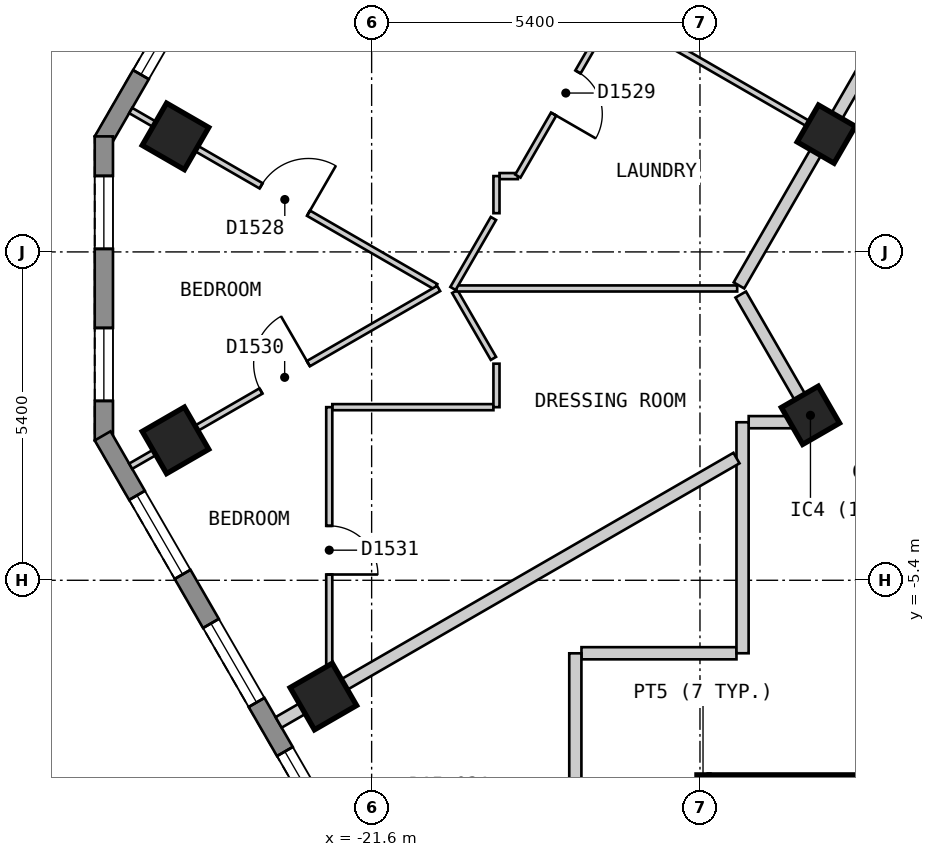
"""IFC4 building model, lengths in metres.
Left out: names, types, materials, properties, quantities, classifications, styles, units other than length and angle.
Written with IfcOpenShell. Run it as: python <this file> out.ifc"""

import sys

from ifc_helpers import new_model, si_unit, direction, frame, frame_2d, origin, origin_2d, place, context, subcontext, project, spatial, polyline, rectangle, outline, extrude, element, fill, save


model = new_model("IFC4")
c1 = context("Model", 3, precision=1e-05, world=origin(), true_north=direction((0.0, 1.0)))
c2 = subcontext(c1, "Body", "Model", "MODEL_VIEW")
j1 = project(units=[si_unit("LENGTHUNIT", "METRE"), si_unit("PLANEANGLEUNIT", "RADIAN")], contexts=[c1])
p1 = place(None, origin())
s1 = spatial("IfcSite", under=j1, at=p1, CompositionType="ELEMENT")
p2 = place(p1, origin())
s2 = spatial("IfcBuilding", under=s1, at=p2, CompositionType="ELEMENT")
p3 = place(p2, frame((0.0, 0.0, 196.2)))
s3 = spatial("IfcBuildingStorey", under=s2, at=p3, CompositionType="ELEMENT", Elevation=196.2)
for number, where, z_axis, x_axis in (
    (1, (-24.826, 1.9, 0.0), (0.0, 0.0, 1.0), (-0.5, -0.866, 0.0)),
    (2, (-24.826, -3.099, 0.0), (0.0, 0.0, 1.0), (0.5, -0.866, 0.0)),
    (3, (-22.394, -7.312, 0.0), (0.0, 0.0, 1.0), (0.5, -0.866, 0.0)),
):
    element("IfcColumn", number, at=place(p3, frame(where, z_axis=z_axis, x_axis=x_axis)), inside=s3, PredefinedType="COLUMN", context=c2, shape_type="SweptSolid", body=[
        extrude(rectangle(XDim=0.8, YDim=0.8, at=origin_2d()), origin(), (0.0, 0.0, 1.0), 3.0),
    ])
for number, where, z_axis, x_axis in (
    (4, (-14.383, -2.687, 0.0), (0.0, 0.0, 1.0), (0.5, -0.866, 0.0)),
    (5, (-14.123, 1.937, 0.0), (0.0, 0.0, 1.0), (-0.5, -0.866, 0.0)),
):
    element("IfcColumn", number, at=place(p3, frame(where, z_axis=z_axis, x_axis=x_axis)), inside=s3, PredefinedType="COLUMN", context=c2, shape_type="SweptSolid", body=[
        extrude(rectangle(XDim=0.7, YDim=0.7, at=origin_2d()), origin(), (0.0, 0.0, 1.0), 3.0),
    ])
p4 = place(p3, frame((-14.592, 21.625, 0.0), z_axis=(0.0, 0.0, 1.0), x_axis=(-0.500010537973, -0.866019319597, 0.0)))
e6 = element("IfcWall", 6, at=p4, inside=s3, PredefinedType="SOLIDWALL", context=c2, shape_type="SweptSolid", body=[
    extrude(outline(polyline([(0.0, -0.15), (22.863, -0.15), (22.783, 0.15), (0.08, 0.15), (0.0, -0.15)])), origin(), (0.0, 0.0, 1.0), 2.6),
])
p5 = place(p4, frame((1.259, 0.0, 0.15)))
e7 = element("IfcOpeningElement", 7, at=p5, cuts=e6, PredefinedType="OPENING", context=c2, shape_type="SweptSolid", body=[
    extrude(rectangle(XDim=1.5, YDim=2.1, at=frame_2d((0.75, 1.05))), frame((0.0, 0.16, 0.0), z_axis=(0.0, -1.0, 0.0), x_axis=(1.0, 0.0, 0.0)), (0.0, 0.0, 1.0), 0.32),
])
p6 = place(p4, frame((3.952, 0.0, 0.15)))
e8 = element("IfcOpeningElement", 8, at=p6, cuts=e6, PredefinedType="OPENING", context=c2, shape_type="SweptSolid", body=[
    extrude(rectangle(XDim=1.5, YDim=2.1, at=frame_2d((0.75, 1.05))), frame((0.0, 0.16, 0.0), z_axis=(0.0, -1.0, 0.0), x_axis=(1.0, 0.0, 0.0)), (0.0, 0.0, 1.0), 0.32),
])
p7 = place(p4, frame((6.644, 0.0, 0.15)))
e9 = element("IfcOpeningElement", 9, at=p7, cuts=e6, PredefinedType="OPENING", context=c2, shape_type="SweptSolid", body=[
    extrude(rectangle(XDim=1.5, YDim=2.1, at=frame_2d((0.75, 1.05))), frame((0.0, 0.16, 0.0), z_axis=(0.0, -1.0, 0.0), x_axis=(1.0, 0.0, 0.0)), (0.0, 0.0, 1.0), 0.32),
])
p8 = place(p4, frame((9.335, 0.0, 0.15)))
e10 = element("IfcOpeningElement", 10, at=p8, cuts=e6, PredefinedType="OPENING", context=c2, shape_type="SweptSolid", body=[
    extrude(rectangle(XDim=1.5, YDim=2.1, at=frame_2d((0.75, 1.05))), frame((0.0, 0.16, 0.0), z_axis=(0.0, -1.0, 0.0), x_axis=(1.0, 0.0, 0.0)), (0.0, 0.0, 1.0), 0.32),
])
p9 = place(p4, frame((12.028, 0.0, 0.15)))
e11 = element("IfcOpeningElement", 11, at=p9, cuts=e6, PredefinedType="OPENING", context=c2, shape_type="SweptSolid", body=[
    extrude(rectangle(XDim=1.5, YDim=2.1, at=frame_2d((0.75, 1.05))), frame((0.0, 0.16, 0.0), z_axis=(0.0, -1.0, 0.0), x_axis=(1.0, 0.0, 0.0)), (0.0, 0.0, 1.0), 0.32),
])
p10 = place(p4, frame((14.72, 0.0, 0.15)))
e12 = element("IfcOpeningElement", 12, at=p10, cuts=e6, PredefinedType="OPENING", context=c2, shape_type="SweptSolid", body=[
    extrude(rectangle(XDim=1.5, YDim=2.1, at=frame_2d((0.75, 1.05))), frame((0.0, 0.16, 0.0), z_axis=(0.0, -1.0, 0.0), x_axis=(1.0, 0.0, 0.0)), (0.0, 0.0, 1.0), 0.32),
])
p11 = place(p4, frame((17.411, 0.0, 0.15)))
e13 = element("IfcOpeningElement", 13, at=p11, cuts=e6, PredefinedType="OPENING", context=c2, shape_type="SweptSolid", body=[
    extrude(rectangle(XDim=1.5, YDim=2.1, at=frame_2d((0.75, 1.05))), frame((0.0, 0.16, 0.0), z_axis=(0.0, -1.0, 0.0), x_axis=(1.0, 0.0, 0.0)), (0.0, 0.0, 1.0), 0.32),
])
p12 = place(p4, frame((20.104, 0.0, 0.15)))
e14 = element("IfcOpeningElement", 14, at=p12, cuts=e6, PredefinedType="OPENING", context=c2, shape_type="SweptSolid", body=[
    extrude(rectangle(XDim=1.5, YDim=2.1, at=frame_2d((0.75, 1.05))), frame((0.0, 0.16, 0.0), z_axis=(0.0, -1.0, 0.0), x_axis=(1.0, 0.0, 0.0)), (0.0, 0.0, 1.0), 0.32),
])
p13 = place(p3, frame((-26.004, 1.9, 0.0), z_axis=(0.0, 0.0, 1.0), x_axis=(0.0, -1.0, 0.0)))
e15 = element("IfcWall", 15, at=p13, inside=s3, PredefinedType="SOLIDWALL", context=c2, shape_type="SweptSolid", body=[
    extrude(outline(polyline([(0.0, -0.15), (5.0, -0.15), (4.92, 0.15), (0.08, 0.15), (0.0, -0.15)])), origin(), (0.0, 0.0, 1.0), 2.6),
])
p14 = place(p13, frame((0.65, 0.0, 0.15)))
e16 = element("IfcOpeningElement", 16, at=p14, cuts=e15, PredefinedType="OPENING", context=c2, shape_type="SweptSolid", body=[
    extrude(rectangle(XDim=1.2, YDim=2.1, at=frame_2d((0.6, 1.05))), frame((0.0, 0.16, 0.0), z_axis=(0.0, -1.0, 0.0), x_axis=(1.0, 0.0, 0.0)), (0.0, 0.0, 1.0), 0.32),
])
p15 = place(p13, frame((3.15, 0.0, 0.15)))
e17 = element("IfcOpeningElement", 17, at=p15, cuts=e15, PredefinedType="OPENING", context=c2, shape_type="SweptSolid", body=[
    extrude(rectangle(XDim=1.2, YDim=2.1, at=frame_2d((0.6, 1.05))), frame((0.0, 0.16, 0.0), z_axis=(0.0, -1.0, 0.0), x_axis=(1.0, 0.0, 0.0)), (0.0, 0.0, 1.0), 0.32),
])
p16 = place(p3, frame((-26.024, -3.025, 0.0), z_axis=(0.0, 0.0, 1.0), x_axis=(0.500018670445, -0.86601462413, 0.0)))
e18 = element("IfcWall", 18, at=p16, inside=s3, PredefinedType="SOLIDWALL", context=c2, shape_type="SweptSolid", body=[
    extrude(outline(polyline([(0.0, -0.15), (20.785, -0.15), (20.705, 0.15), (0.08, 0.15), (0.0, -0.15)])), origin(), (0.0, 0.0, 1.0), 2.6),
])
p17 = place(p16, frame((1.13, 0.0, 0.15)))
e19 = element("IfcOpeningElement", 19, at=p17, cuts=e18, PredefinedType="OPENING", context=c2, shape_type="SweptSolid", body=[
    extrude(rectangle(XDim=1.5, YDim=2.1, at=frame_2d((0.75, 1.05))), frame((0.0, 0.16, 0.0), z_axis=(0.0, -1.0, 0.0), x_axis=(1.0, 0.0, 0.0)), (0.0, 0.0, 1.0), 0.32),
])
p18 = place(p16, frame((3.562, 0.0, 0.15)))
e20 = element("IfcOpeningElement", 20, at=p18, cuts=e18, PredefinedType="OPENING", context=c2, shape_type="SweptSolid", body=[
    extrude(rectangle(XDim=1.5, YDim=2.1, at=frame_2d((0.75, 1.05))), frame((0.0, 0.16, 0.0), z_axis=(0.0, -1.0, 0.0), x_axis=(1.0, 0.0, 0.0)), (0.0, 0.0, 1.0), 0.32),
])
p19 = place(p16, frame((5.994, 0.0, 0.15)))
e21 = element("IfcOpeningElement", 21, at=p19, cuts=e18, PredefinedType="OPENING", context=c2, shape_type="SweptSolid", body=[
    extrude(rectangle(XDim=1.5, YDim=2.1, at=frame_2d((0.75, 1.05))), frame((0.0, 0.16, 0.0), z_axis=(0.0, -1.0, 0.0), x_axis=(1.0, 0.0, 0.0)), (0.0, 0.0, 1.0), 0.32),
])
p20 = place(p16, frame((8.425, 0.0, 0.15)))
e22 = element("IfcOpeningElement", 22, at=p20, cuts=e18, PredefinedType="OPENING", context=c2, shape_type="SweptSolid", body=[
    extrude(rectangle(XDim=1.5, YDim=2.1, at=frame_2d((0.75, 1.05))), frame((0.0, 0.16, 0.0), z_axis=(0.0, -1.0, 0.0), x_axis=(1.0, 0.0, 0.0)), (0.0, 0.0, 1.0), 0.32),
])
p21 = place(p16, frame((10.857, 0.0, 0.15)))
e23 = element("IfcOpeningElement", 23, at=p21, cuts=e18, PredefinedType="OPENING", context=c2, shape_type="SweptSolid", body=[
    extrude(rectangle(XDim=1.5, YDim=2.1, at=frame_2d((0.75, 1.05))), frame((0.0, 0.16, 0.0), z_axis=(0.0, -1.0, 0.0), x_axis=(1.0, 0.0, 0.0)), (0.0, 0.0, 1.0), 0.32),
])
p22 = place(p16, frame((13.289, 0.0, 0.15)))
e24 = element("IfcOpeningElement", 24, at=p22, cuts=e18, PredefinedType="OPENING", context=c2, shape_type="SweptSolid", body=[
    extrude(rectangle(XDim=1.5, YDim=2.1, at=frame_2d((0.75, 1.05))), frame((0.0, 0.16, 0.0), z_axis=(0.0, -1.0, 0.0), x_axis=(1.0, 0.0, 0.0)), (0.0, 0.0, 1.0), 0.32),
])
p23 = place(p16, frame((15.722, 0.0, 0.15)))
e25 = element("IfcOpeningElement", 25, at=p23, cuts=e18, PredefinedType="OPENING", context=c2, shape_type="SweptSolid", body=[
    extrude(rectangle(XDim=1.5, YDim=2.1, at=frame_2d((0.75, 1.05))), frame((0.0, 0.16, 0.0), z_axis=(0.0, -1.0, 0.0), x_axis=(1.0, 0.0, 0.0)), (0.0, 0.0, 1.0), 0.32),
])
p24 = place(p16, frame((18.154, 0.0, 0.15)))
e26 = element("IfcOpeningElement", 26, at=p24, cuts=e18, PredefinedType="OPENING", context=c2, shape_type="SweptSolid", body=[
    extrude(rectangle(XDim=1.5, YDim=2.1, at=frame_2d((0.75, 1.05))), frame((0.0, 0.16, 0.0), z_axis=(0.0, -1.0, 0.0), x_axis=(1.0, 0.0, 0.0)), (0.0, 0.0, 1.0), 0.32),
])
p25 = place(p3, frame((-15.53, -0.701, 0.0), z_axis=(0.0, 0.0, 1.0), x_axis=(0.499972710878, -0.866041158593, 0.0)))
e27 = element("IfcWall", 27, at=p25, inside=s3, PredefinedType="PARTITIONING", context=c2, shape_type="SweptSolid", body=[
    extrude(rectangle(XDim=2.308, YDim=0.2, at=frame_2d((1.154, 0.0))), origin(), (0.0, 0.0, 1.0), 2.6),
])
p26 = place(p3, frame((-18.149, -6.6, 0.0), z_axis=(0.0, 0.0, 1.0), x_axis=(1.0, 0.0, 0.0)))
e28 = element("IfcWall", 28, at=p26, inside=s3, PredefinedType="PARTITIONING", context=c2, shape_type="SweptSolid", body=[
    extrude(rectangle(XDim=2.549, YDim=0.2, at=frame_2d((1.274, 0.0))), origin(), (0.0, 0.0, 1.0), 2.6),
])
p27 = place(p3, frame((-15.399, -2.8, 0.0), z_axis=(0.0, 0.0, 1.0), x_axis=(1.0, 0.0, 0.0)))
e29 = element("IfcWall", 29, at=p27, inside=s3, PredefinedType="PARTITIONING", context=c2, shape_type="SweptSolid", body=[
    extrude(rectangle(XDim=1.081, YDim=0.2, at=frame_2d((0.541, 0.0))), origin(), (0.0, 0.0, 1.0), 2.6),
])
p28 = place(p3, frame((-15.559, -0.551, 0.0), z_axis=(0.0, 0.0, 1.0), x_axis=(0.499964997208, 0.866045611713, 0.0)))
e30 = element("IfcWall", 30, at=p28, inside=s3, PredefinedType="PARTITIONING", context=c2, shape_type="SweptSolid", body=[
    extrude(rectangle(XDim=9.643, YDim=0.2, at=frame_2d((4.821, 0.0))), origin(), (0.0, 0.0, 1.0), 2.6),
])
p29 = place(p28, frame((5.088, 0.0, 0.0)))
e31 = element("IfcOpeningElement", 31, at=p29, cuts=e30, PredefinedType="OPENING", context=c2, shape_type="SweptSolid", body=[
    extrude(rectangle(XDim=1.0, YDim=2.1, at=frame_2d((0.5, 1.05))), frame((0.0, 0.11, 0.0), z_axis=(0.0, -1.0, 0.0), x_axis=(1.0, 0.0, 0.0)), (0.0, 0.0, 1.0), 0.22),
])
p30 = place(p3, frame((-15.5, -6.6, 0.0), z_axis=(0.0, 0.0, 1.0), x_axis=(0.0, 1.0, 0.0)))
e32 = element("IfcWall", 32, at=p30, inside=s3, PredefinedType="PARTITIONING", context=c2, shape_type="SweptSolid", body=[
    extrude(rectangle(XDim=3.799, YDim=0.2, at=frame_2d((1.899, 0.0))), origin(), (0.0, 0.0, 1.0), 2.6),
])
p31 = place(p3, frame((-18.25, -16.152, 0.0), z_axis=(0.0, 0.0, 1.0), x_axis=(0.0, 1.0, 0.0)))
e33 = element("IfcWall", 33, at=p31, inside=s3, PredefinedType="PARTITIONING", context=c2, shape_type="SweptSolid", body=[
    extrude(rectangle(XDim=9.551, YDim=0.2, at=frame_2d((4.775, 0.0))), origin(), (0.0, 0.0, 1.0), 2.6),
])
p32 = place(p31, frame((6.026, 0.0, 0.0)))
e34 = element("IfcOpeningElement", 34, at=p32, cuts=e33, PredefinedType="OPENING", context=c2, shape_type="SweptSolid", body=[
    extrude(rectangle(XDim=0.8, YDim=2.1, at=frame_2d((0.4, 1.05))), frame((0.0, 0.11, 0.0), z_axis=(0.0, -1.0, 0.0), x_axis=(1.0, 0.0, 0.0)), (0.0, 0.0, 1.0), 0.22),
])
p33 = place(p3, frame((-20.233, -0.651, 0.0), z_axis=(0.0, 0.0, 1.0), x_axis=(0.500498449207, -0.865737432679, 0.0)))
e35 = element("IfcWall", 35, at=p33, inside=s3, PredefinedType="PARTITIONING", context=c2, shape_type="SweptSolid", body=[
    extrude(rectangle(XDim=1.271, YDim=0.1, at=frame_2d((0.635, 0.0))), origin(), (0.0, 0.0, 1.0), 2.6),
])
p34 = place(p3, frame((-17.585, 3.936, 0.0), z_axis=(0.0, 0.0, 1.0), x_axis=(0.865979019114, -0.500080332001, 0.0)))
e36 = element("IfcWall", 36, at=p34, inside=s3, PredefinedType="PARTITIONING", context=c2, shape_type="SweptSolid", body=[
    extrude(rectangle(XDim=3.897, YDim=0.1, at=frame_2d((1.949, 0.0))), origin(), (0.0, 0.0, 1.0), 2.6),
])
p35 = place(p3, frame((-25.562, 2.325, 0.0), z_axis=(0.0, 0.0, 1.0), x_axis=(0.86599890761, -0.500045889912, 0.0)))
e37 = element("IfcWall", 37, at=p35, inside=s3, PredefinedType="PARTITIONING", context=c2, shape_type="SweptSolid", body=[
    extrude(rectangle(XDim=5.793, YDim=0.1, at=frame_2d((2.897, 0.0))), origin(), (0.0, 0.0, 1.0), 2.6),
])
p36 = place(p35, frame((2.476, 0.0, 0.0)))
e38 = element("IfcOpeningElement", 38, at=p36, cuts=e37, PredefinedType="OPENING", context=c2, shape_type="SweptSolid", body=[
    extrude(rectangle(XDim=0.9, YDim=2.1, at=frame_2d((0.45, 1.05))), frame((0.0, 0.06, 0.0), z_axis=(0.0, -1.0, 0.0), x_axis=(1.0, 0.0, 0.0)), (0.0, 0.0, 1.0), 0.12),
])
p37 = place(p3, frame((-20.204, -0.601, 0.0), z_axis=(0.0, 0.0, 1.0), x_axis=(1.0, 0.0, 0.0)))
e39 = element("IfcWall", 39, at=p37, inside=s3, PredefinedType="PARTITIONING", context=c2, shape_type="SweptSolid", body=[
    extrude(rectangle(XDim=4.616, YDim=0.1, at=frame_2d((2.308, 0.0))), origin(), (0.0, 0.0, 1.0), 2.6),
])
p38 = place(p3, frame((-22.247, -2.553, 0.0), z_axis=(0.0, 0.0, 1.0), x_axis=(1.0, 0.0, 0.0)))
e40 = element("IfcWall", 40, at=p38, inside=s3, PredefinedType="PARTITIONING", context=c2, shape_type="SweptSolid", body=[
    extrude(rectangle(XDim=2.65, YDim=0.1, at=frame_2d((1.325, 0.0))), origin(), (0.0, 0.0, 1.0), 2.6),
])
p39 = place(p3, frame((-19.497, 1.247, 0.0), z_axis=(0.0, 0.0, 1.0), x_axis=(1.0, 0.0, 0.0)))
e41 = element("IfcWall", 41, at=p39, inside=s3, PredefinedType="PARTITIONING", context=c2, shape_type="SweptSolid", body=[
    extrude(rectangle(XDim=0.302, YDim=0.1, at=frame_2d((0.151, 0.0))), origin(), (0.0, 0.0, 1.0), 2.6),
])
p40 = place(p3, frame((-20.262, -0.601, 0.0), z_axis=(0.0, 0.0, 1.0), x_axis=(0.500247001515, 0.86588275042, 0.0)))
e42 = element("IfcWall", 42, at=p40, inside=s3, PredefinedType="PARTITIONING", context=c2, shape_type="SweptSolid", body=[
    extrude(rectangle(XDim=1.329, YDim=0.1, at=frame_2d((0.665, 0.0))), origin(), (0.0, 0.0, 1.0), 2.6),
])
p41 = place(p3, frame((-19.195, 1.247, 0.0), z_axis=(0.0, 0.0, 1.0), x_axis=(0.499959862915, 0.866048575701, 0.0)))
e43 = element("IfcWall", 43, at=p41, inside=s3, PredefinedType="PARTITIONING", context=c2, shape_type="SweptSolid", body=[
    extrude(rectangle(XDim=7.566, YDim=0.1, at=frame_2d((3.783, 0.0))), origin(), (0.0, 0.0, 1.0), 2.6),
])
p42 = place(p41, frame((5.354, 0.0, 0.0)))
e44 = element("IfcOpeningElement", 44, at=p42, cuts=e43, PredefinedType="OPENING", context=c2, shape_type="SweptSolid", body=[
    extrude(rectangle(XDim=0.9, YDim=2.1, at=frame_2d((0.45, 1.05))), frame((0.0, 0.06, 0.0), z_axis=(0.0, -1.0, 0.0), x_axis=(1.0, 0.0, 0.0)), (0.0, 0.0, 1.0), 0.12),
])
p43 = place(p41, frame((1.177, 0.0, 0.0)))
e45 = element("IfcOpeningElement", 45, at=p43, cuts=e43, PredefinedType="OPENING", context=c2, shape_type="SweptSolid", body=[
    extrude(rectangle(XDim=0.8, YDim=2.1, at=frame_2d((0.4, 1.05))), frame((0.0, 0.06, 0.0), z_axis=(0.0, -1.0, 0.0), x_axis=(1.0, 0.0, 0.0)), (0.0, 0.0, 1.0), 0.12),
])
p44 = place(p3, frame((-19.547, -2.553, 0.0), z_axis=(0.0, 0.0, 1.0), x_axis=(0.0, 1.0, 0.0)))
e46 = element("IfcWall", 46, at=p44, inside=s3, PredefinedType="PARTITIONING", context=c2, shape_type="SweptSolid", body=[
    extrude(rectangle(XDim=0.715, YDim=0.1, at=frame_2d((0.357, 0.0))), origin(), (0.0, 0.0, 1.0), 2.6),
])
p45 = place(p3, frame((-19.547, 0.637, 0.0), z_axis=(0.0, 0.0, 1.0), x_axis=(0.0, 1.0, 0.0)))
e47 = element("IfcWall", 47, at=p45, inside=s3, PredefinedType="PARTITIONING", context=c2, shape_type="SweptSolid", body=[
    extrude(rectangle(XDim=0.61, YDim=0.1, at=frame_2d((0.305, 0.0))), origin(), (0.0, 0.0, 1.0), 2.6),
])
p46 = place(p3, frame((-22.297, -7.141, 0.0), z_axis=(0.0, 0.0, 1.0), x_axis=(0.0, 1.0, 0.0)))
e48 = element("IfcWall", 48, at=p46, inside=s3, PredefinedType="PARTITIONING", context=c2, shape_type="SweptSolid", body=[
    extrude(rectangle(XDim=4.588, YDim=0.1, at=frame_2d((2.294, 0.0))), origin(), (0.0, 0.0, 1.0), 2.6),
])
p47 = place(p46, frame((1.836, 0.0, 0.0)))
e49 = element("IfcOpeningElement", 49, at=p47, cuts=e48, PredefinedType="OPENING", context=c2, shape_type="SweptSolid", body=[
    extrude(rectangle(XDim=0.8, YDim=2.1, at=frame_2d((0.4, 1.05))), frame((0.0, 0.06, 0.0), z_axis=(0.0, -1.0, 0.0), x_axis=(1.0, 0.0, 0.0)), (0.0, 0.0, 1.0), 0.12),
])
p48 = place(p3, frame((-25.563, -3.524, 0.0), z_axis=(0.0, 0.0, 1.0), x_axis=(0.866128586522, 0.499821239653, 0.0)))
e50 = element("IfcWall", 50, at=p48, inside=s3, PredefinedType="PARTITIONING", context=c2, shape_type="SweptSolid", body=[
    extrude(rectangle(XDim=5.848, YDim=0.1, at=frame_2d((2.924, 0.0))), origin(), (0.0, 0.0, 1.0), 2.6),
])
p49 = place(p48, frame((2.474, 0.0, 0.0)))
e51 = element("IfcOpeningElement", 51, at=p49, cuts=e50, PredefinedType="OPENING", context=c2, shape_type="SweptSolid", body=[
    extrude(rectangle(XDim=0.9, YDim=2.1, at=frame_2d((0.45, 1.05))), frame((0.0, 0.06, 0.0), z_axis=(0.0, -1.0, 0.0), x_axis=(1.0, 0.0, 0.0)), (0.0, 0.0, 1.0), 0.12),
])
p50 = place(p3, frame((-23.13, -7.737, 0.0), z_axis=(0.0, 0.0, 1.0), x_axis=(0.866033148899, 0.499986584829, 0.0)))
e52 = element("IfcWall", 52, at=p50, inside=s3, PredefinedType="PARTITIONING", context=c2, shape_type="SweptSolid", body=[
    extrude(rectangle(XDim=8.695, YDim=0.2, at=frame_2d((4.347, 0.0))), origin(), (0.0, 0.0, 1.0), 2.6),
])
p51 = place(p3, frame((-16.15, -14.4, 0.0), z_axis=(0.0, 0.0, 1.0), x_axis=(0.0, 1.0, 0.0)))
e53 = element("IfcWall", 53, at=p51, inside=s3, PredefinedType="SOLIDWALL", context=c2, shape_type="SweptSolid", body=[
    extrude(rectangle(XDim=5.8, YDim=0.2, at=frame_2d((2.9, 0.0))), origin(), (0.0, 0.0, 1.0), 2.6),
])
p52 = place(p3, frame((-16.05, -8.7, 0.0), z_axis=(0.0, 0.0, 1.0), x_axis=(1.0, 0.0, 0.0)))
e54 = element("IfcWall", 54, at=p52, inside=s3, PredefinedType="SOLIDWALL", context=c2, shape_type="SweptSolid", body=[
    extrude(rectangle(XDim=2.75, YDim=0.2, at=frame_2d((1.375, 0.0))), origin(), (0.0, 0.0, 1.0), 2.6),
])
p53 = place(p12, origin())
e55 = element("IfcWindow", 55, at=p53, inside=s3, PartitioningType="SINGLE_PANEL", PredefinedType="WINDOW", context=c2, shape_type="SweptSolid", body=[
    extrude(rectangle(XDim=1.5, YDim=2.1, at=frame_2d((0.75, 1.05))), frame((0.0, 0.03, 0.0), z_axis=(0.0, -1.0, 0.0), x_axis=(1.0, 0.0, 0.0)), (0.0, 0.0, 1.0), 0.06),
])
fill(e14, e55)
p54 = place(p14, origin())
e56 = element("IfcWindow", 56, at=p54, inside=s3, PartitioningType="SINGLE_PANEL", PredefinedType="WINDOW", context=c2, shape_type="SweptSolid", body=[
    extrude(rectangle(XDim=1.2, YDim=2.1, at=frame_2d((0.6, 1.05))), frame((0.0, 0.03, 0.0), z_axis=(0.0, -1.0, 0.0), x_axis=(1.0, 0.0, 0.0)), (0.0, 0.0, 1.0), 0.06),
])
fill(e16, e56)
p55 = place(p15, origin())
e57 = element("IfcWindow", 57, at=p55, inside=s3, PartitioningType="SINGLE_PANEL", PredefinedType="WINDOW", context=c2, shape_type="SweptSolid", body=[
    extrude(rectangle(XDim=1.2, YDim=2.1, at=frame_2d((0.6, 1.05))), frame((0.0, 0.03, 0.0), z_axis=(0.0, -1.0, 0.0), x_axis=(1.0, 0.0, 0.0)), (0.0, 0.0, 1.0), 0.06),
])
fill(e17, e57)
p56 = place(p17, origin())
e58 = element("IfcWindow", 58, at=p56, inside=s3, PartitioningType="SINGLE_PANEL", PredefinedType="WINDOW", context=c2, shape_type="SweptSolid", body=[
    extrude(rectangle(XDim=1.5, YDim=2.1, at=frame_2d((0.75, 1.05))), frame((0.0, 0.03, 0.0), z_axis=(0.0, -1.0, 0.0), x_axis=(1.0, 0.0, 0.0)), (0.0, 0.0, 1.0), 0.06),
])
fill(e19, e58)
p57 = place(p18, origin())
e59 = element("IfcWindow", 59, at=p57, inside=s3, PartitioningType="SINGLE_PANEL", PredefinedType="WINDOW", context=c2, shape_type="SweptSolid", body=[
    extrude(rectangle(XDim=1.5, YDim=2.1, at=frame_2d((0.75, 1.05))), frame((0.0, 0.03, 0.0), z_axis=(0.0, -1.0, 0.0), x_axis=(1.0, 0.0, 0.0)), (0.0, 0.0, 1.0), 0.06),
])
fill(e20, e59)
p58 = place(p19, origin())
e60 = element("IfcWindow", 60, at=p58, inside=s3, PartitioningType="SINGLE_PANEL", PredefinedType="WINDOW", context=c2, shape_type="SweptSolid", body=[
    extrude(rectangle(XDim=1.5, YDim=2.1, at=frame_2d((0.75, 1.05))), frame((0.0, 0.03, 0.0), z_axis=(0.0, -1.0, 0.0), x_axis=(1.0, 0.0, 0.0)), (0.0, 0.0, 1.0), 0.06),
])
fill(e21, e60)
p59 = place(p36, origin())
e61 = element("IfcDoor", 61, at=p59, inside=s3, OperationType="SINGLE_SWING_RIGHT", PredefinedType="DOOR", context=c2, shape_type="SweptSolid", body=[
    extrude(rectangle(XDim=0.9, YDim=2.1, at=frame_2d((0.45, 1.05))), frame((0.0, 0.025, 0.0), z_axis=(0.0, -1.0, 0.0), x_axis=(1.0, 0.0, 0.0)), (0.0, 0.0, 1.0), 0.05),
])
fill(e38, e61)
p60 = place(p43, origin())
e62 = element("IfcDoor", 62, at=p60, inside=s3, OperationType="SINGLE_SWING_LEFT", PredefinedType="DOOR", context=c2, shape_type="SweptSolid", body=[
    extrude(rectangle(XDim=0.8, YDim=2.1, at=frame_2d((0.4, 1.05))), frame((0.0, 0.025, 0.0), z_axis=(0.0, -1.0, 0.0), x_axis=(1.0, 0.0, 0.0)), (0.0, 0.0, 1.0), 0.05),
])
fill(e45, e62)
p61 = place(p49, origin())
e63 = element("IfcDoor", 63, at=p61, inside=s3, OperationType="SINGLE_SWING_RIGHT", PredefinedType="DOOR", context=c2, shape_type="SweptSolid", body=[
    extrude(rectangle(XDim=0.9, YDim=2.1, at=frame_2d((0.45, 1.05))), frame((0.0, 0.025, 0.0), z_axis=(0.0, -1.0, 0.0), x_axis=(1.0, 0.0, 0.0)), (0.0, 0.0, 1.0), 0.05),
])
fill(e51, e63)
p62 = place(p47, origin())
e64 = element("IfcDoor", 64, at=p62, inside=s3, OperationType="SINGLE_SWING_LEFT", PredefinedType="DOOR", context=c2, shape_type="SweptSolid", body=[
    extrude(rectangle(XDim=0.8, YDim=2.1, at=frame_2d((0.4, 1.05))), frame((0.0, 0.025, 0.0), z_axis=(0.0, -1.0, 0.0), x_axis=(1.0, 0.0, 0.0)), (0.0, 0.0, 1.0), 0.05),
])
fill(e49, e64)
save(model, sys.argv[1])
